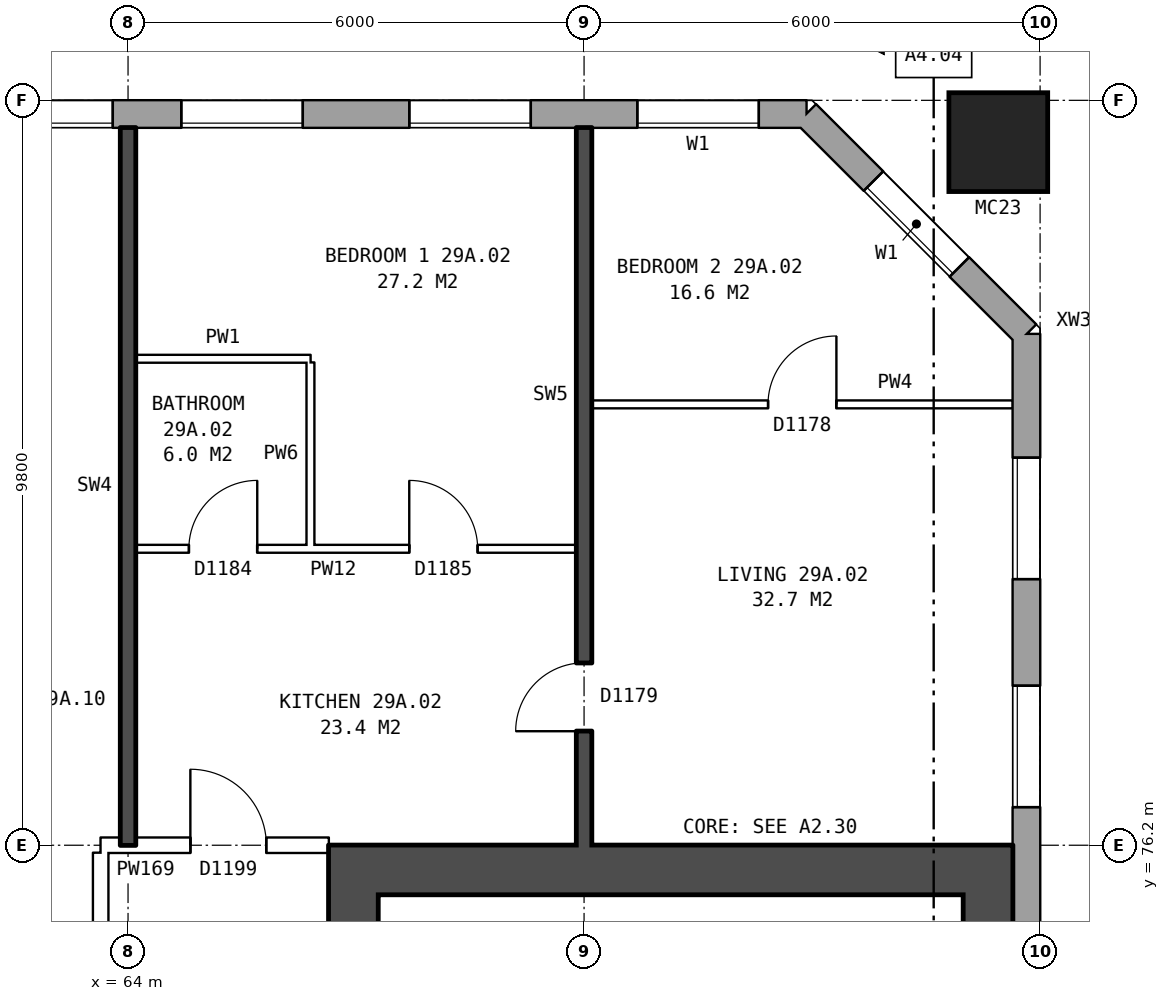
"""IFC4 building model, lengths in metres.
Left out: names, types, materials, properties, quantities, classifications, styles, units other than length and angle.
Written with IfcOpenShell. Run it as: python <this file> out.ifc"""

import sys

from ifc_helpers import new_model, si_unit, direction, frame, frame_2d, origin, origin_2d, place, context, subcontext, project, spatial, rectangle, hollow_rectangle, extrude, element, fill, save


model = new_model("IFC4")
c1 = context("Model", 3, precision=1e-05, world=origin(), true_north=direction((0.0, 1.0)))
c2 = subcontext(c1, "Body", "Model", "MODEL_VIEW")
j1 = project(units=[si_unit("LENGTHUNIT", "METRE"), si_unit("PLANEANGLEUNIT", "RADIAN")], contexts=[c1])
p1 = place(None, origin())
s1 = spatial("IfcSite", under=j1, at=p1, CompositionType="ELEMENT")
p2 = place(p1, origin())
s2 = spatial("IfcBuilding", under=s1, at=p2, CompositionType="ELEMENT")
p3 = place(p2, frame((0.0, 0.0, 105.7)))
s3 = spatial("IfcBuildingStorey", under=s2, at=p3, CompositionType="ELEMENT", Elevation=105.7)
p4 = place(p3, frame((75.45, 85.45, 0.0), z_axis=(0.0, 0.0, 1.0), x_axis=(1.0, 0.0, 0.0)))
e1 = element("IfcColumn", 1, at=p4, inside=s3, PredefinedType="COLUMN", context=c2, shape_type="SweptSolid", body=[
    extrude(hollow_rectangle(XDim=1.3, YDim=1.3, WallThickness=0.07, at=origin_2d()), origin(), (0.0, 0.0, 1.0), 3.1),
])
p5 = place(p3, frame((75.82, 57.075, 0.0), z_axis=(0.0, 0.0, 1.0), x_axis=(0.0, 1.0, 0.0)))
e2 = element("IfcWall", 2, at=p5, inside=s3, PredefinedType="STANDARD", context=c2, shape_type="SweptSolid", body=[
    extrude(rectangle(XDim=25.851, YDim=0.36, at=frame_2d((12.925, 0.0))), origin(), (0.0, 0.0, 1.0), 2.85),
])
p6 = place(p5, frame((1.625, 0.0, 0.8)))
e3 = element("IfcOpeningElement", 3, at=p6, cuts=e2, PredefinedType="OPENING", context=c2, shape_type="SweptSolid", body=[
    extrude(rectangle(XDim=1.6, YDim=1.8, at=frame_2d((0.8, 0.9))), frame((0.0, 0.19, 0.0), z_axis=(0.0, -1.0, 0.0), x_axis=(1.0, 0.0, 0.0)), (0.0, 0.0, 1.0), 0.38),
])
p7 = place(p5, frame((4.625, 0.0, 0.8)))
e4 = element("IfcOpeningElement", 4, at=p7, cuts=e2, PredefinedType="OPENING", context=c2, shape_type="SweptSolid", body=[
    extrude(rectangle(XDim=1.6, YDim=1.8, at=frame_2d((0.8, 0.9))), frame((0.0, 0.19, 0.0), z_axis=(0.0, -1.0, 0.0), x_axis=(1.0, 0.0, 0.0)), (0.0, 0.0, 1.0), 0.38),
])
p8 = place(p5, frame((19.625, 0.0, 0.8)))
e5 = element("IfcOpeningElement", 5, at=p8, cuts=e2, PredefinedType="OPENING", context=c2, shape_type="SweptSolid", body=[
    extrude(rectangle(XDim=1.6, YDim=1.8, at=frame_2d((0.8, 0.9))), frame((0.0, 0.19, 0.0), z_axis=(0.0, -1.0, 0.0), x_axis=(1.0, 0.0, 0.0)), (0.0, 0.0, 1.0), 0.38),
])
p9 = place(p5, frame((22.625, 0.0, 0.8)))
e6 = element("IfcOpeningElement", 6, at=p9, cuts=e2, PredefinedType="OPENING", context=c2, shape_type="SweptSolid", body=[
    extrude(rectangle(XDim=1.6, YDim=1.8, at=frame_2d((0.8, 0.9))), frame((0.0, 0.19, 0.0), z_axis=(0.0, -1.0, 0.0), x_axis=(1.0, 0.0, 0.0)), (0.0, 0.0, 1.0), 0.38),
])
p10 = place(p3, frame((75.82, 82.925, 0.0), z_axis=(0.0, 0.0, 1.0), x_axis=(-0.707106781187, 0.707106781187, 0.0)))
e7 = element("IfcWall", 7, at=p10, inside=s3, PredefinedType="STANDARD", context=c2, shape_type="SweptSolid", body=[
    extrude(rectangle(XDim=4.094, YDim=0.36, at=frame_2d((2.047, 0.0))), origin(), (0.0, 0.0, 1.0), 2.85),
])
p11 = place(p10, frame((1.247, 0.0, 0.8)))
e8 = element("IfcOpeningElement", 8, at=p11, cuts=e7, PredefinedType="OPENING", context=c2, shape_type="SweptSolid", body=[
    extrude(rectangle(XDim=1.6, YDim=1.8, at=frame_2d((0.8, 0.9))), frame((0.0, 0.19, 0.0), z_axis=(0.0, -1.0, 0.0), x_axis=(1.0, 0.0, 0.0)), (0.0, 0.0, 1.0), 0.38),
])
p12 = place(p3, frame((72.925, 85.82, 0.0), z_axis=(0.0, 0.0, 1.0), x_axis=(-1.0, 0.0, 0.0)))
e9 = element("IfcWall", 9, at=p12, inside=s3, PredefinedType="STANDARD", context=c2, shape_type="SweptSolid", body=[
    extrude(rectangle(XDim=44.851, YDim=0.36, at=frame_2d((22.425, 0.0))), origin(), (0.0, 0.0, 1.0), 2.85),
])
p13 = place(p12, frame((0.625, 0.0, 0.8)))
e10 = element("IfcOpeningElement", 10, at=p13, cuts=e9, PredefinedType="OPENING", context=c2, shape_type="SweptSolid", body=[
    extrude(rectangle(XDim=1.6, YDim=1.8, at=frame_2d((0.8, 0.9))), frame((0.0, 0.19, 0.0), z_axis=(0.0, -1.0, 0.0), x_axis=(1.0, 0.0, 0.0)), (0.0, 0.0, 1.0), 0.38),
])
p14 = place(p12, frame((3.625, 0.0, 0.8)))
e11 = element("IfcOpeningElement", 11, at=p14, cuts=e9, PredefinedType="OPENING", context=c2, shape_type="SweptSolid", body=[
    extrude(rectangle(XDim=1.6, YDim=1.8, at=frame_2d((0.8, 0.9))), frame((0.0, 0.19, 0.0), z_axis=(0.0, -1.0, 0.0), x_axis=(1.0, 0.0, 0.0)), (0.0, 0.0, 1.0), 0.38),
])
p15 = place(p12, frame((6.625, 0.0, 0.8)))
e12 = element("IfcOpeningElement", 12, at=p15, cuts=e9, PredefinedType="OPENING", context=c2, shape_type="SweptSolid", body=[
    extrude(rectangle(XDim=1.6, YDim=1.8, at=frame_2d((0.8, 0.9))), frame((0.0, 0.19, 0.0), z_axis=(0.0, -1.0, 0.0), x_axis=(1.0, 0.0, 0.0)), (0.0, 0.0, 1.0), 0.38),
])
p16 = place(p12, frame((9.125, 0.0, 0.8)))
e13 = element("IfcOpeningElement", 13, at=p16, cuts=e9, PredefinedType="OPENING", context=c2, shape_type="SweptSolid", body=[
    extrude(rectangle(XDim=1.6, YDim=1.8, at=frame_2d((0.8, 0.9))), frame((0.0, 0.19, 0.0), z_axis=(0.0, -1.0, 0.0), x_axis=(1.0, 0.0, 0.0)), (0.0, 0.0, 1.0), 0.38),
])
p17 = place(p12, frame((12.825, 0.0, 0.55)))
e14 = element("IfcOpeningElement", 14, at=p17, cuts=e9, PredefinedType="OPENING", context=c2, shape_type="SweptSolid", body=[
    extrude(rectangle(XDim=0.6, YDim=0.9, at=frame_2d((0.3, 0.45))), frame((0.0, 0.19, 0.0), z_axis=(0.0, -1.0, 0.0), x_axis=(1.0, 0.0, 0.0)), (0.0, 0.0, 1.0), 0.38),
])
p18 = place(p12, frame((15.625, 0.0, 0.8)))
e15 = element("IfcOpeningElement", 15, at=p18, cuts=e9, PredefinedType="OPENING", context=c2, shape_type="SweptSolid", body=[
    extrude(rectangle(XDim=1.6, YDim=1.8, at=frame_2d((0.8, 0.9))), frame((0.0, 0.19, 0.0), z_axis=(0.0, -1.0, 0.0), x_axis=(1.0, 0.0, 0.0)), (0.0, 0.0, 1.0), 0.38),
])
p19 = place(p12, frame((18.625, 0.0, 0.8)))
e16 = element("IfcOpeningElement", 16, at=p19, cuts=e9, PredefinedType="OPENING", context=c2, shape_type="SweptSolid", body=[
    extrude(rectangle(XDim=1.6, YDim=1.8, at=frame_2d((0.8, 0.9))), frame((0.0, 0.19, 0.0), z_axis=(0.0, -1.0, 0.0), x_axis=(1.0, 0.0, 0.0)), (0.0, 0.0, 1.0), 0.38),
])
p20 = place(p12, frame((21.625, 0.0, 0.8)))
e17 = element("IfcOpeningElement", 17, at=p20, cuts=e9, PredefinedType="OPENING", context=c2, shape_type="SweptSolid", body=[
    extrude(rectangle(XDim=1.6, YDim=1.8, at=frame_2d((0.8, 0.9))), frame((0.0, 0.19, 0.0), z_axis=(0.0, -1.0, 0.0), x_axis=(1.0, 0.0, 0.0)), (0.0, 0.0, 1.0), 0.38),
])
p21 = place(p12, frame((24.625, 0.0, 0.8)))
e18 = element("IfcOpeningElement", 18, at=p21, cuts=e9, PredefinedType="OPENING", context=c2, shape_type="SweptSolid", body=[
    extrude(rectangle(XDim=1.6, YDim=1.8, at=frame_2d((0.8, 0.9))), frame((0.0, 0.19, 0.0), z_axis=(0.0, -1.0, 0.0), x_axis=(1.0, 0.0, 0.0)), (0.0, 0.0, 1.0), 0.38),
])
p22 = place(p12, frame((27.625, 0.0, 0.8)))
e19 = element("IfcOpeningElement", 19, at=p22, cuts=e9, PredefinedType="OPENING", context=c2, shape_type="SweptSolid", body=[
    extrude(rectangle(XDim=1.6, YDim=1.8, at=frame_2d((0.8, 0.9))), frame((0.0, 0.19, 0.0), z_axis=(0.0, -1.0, 0.0), x_axis=(1.0, 0.0, 0.0)), (0.0, 0.0, 1.0), 0.38),
])
p23 = place(p12, frame((29.525, 0.0, 0.8)))
e20 = element("IfcOpeningElement", 20, at=p23, cuts=e9, PredefinedType="OPENING", context=c2, shape_type="SweptSolid", body=[
    extrude(rectangle(XDim=0.8, YDim=1.8, at=frame_2d((0.4, 0.9))), frame((0.0, 0.19, 0.0), z_axis=(0.0, -1.0, 0.0), x_axis=(1.0, 0.0, 0.0)), (0.0, 0.0, 1.0), 0.38),
])
p24 = place(p12, frame((33.325, 0.0, 1.4)))
e21 = element("IfcOpeningElement", 21, at=p24, cuts=e9, PredefinedType="OPENING", context=c2, shape_type="SweptSolid", body=[
    extrude(rectangle(XDim=1.0, YDim=1.2, at=frame_2d((0.5, 0.6))), frame((0.0, 0.19, 0.0), z_axis=(0.0, -1.0, 0.0), x_axis=(1.0, 0.0, 0.0)), (0.0, 0.0, 1.0), 0.38),
])
p25 = place(p12, frame((36.625, 0.0, 0.8)))
e22 = element("IfcOpeningElement", 22, at=p25, cuts=e9, PredefinedType="OPENING", context=c2, shape_type="SweptSolid", body=[
    extrude(rectangle(XDim=1.6, YDim=1.8, at=frame_2d((0.8, 0.9))), frame((0.0, 0.19, 0.0), z_axis=(0.0, -1.0, 0.0), x_axis=(1.0, 0.0, 0.0)), (0.0, 0.0, 1.0), 0.38),
])
p26 = place(p12, frame((39.625, 0.0, 0.8)))
e23 = element("IfcOpeningElement", 23, at=p26, cuts=e9, PredefinedType="OPENING", context=c2, shape_type="SweptSolid", body=[
    extrude(rectangle(XDim=1.6, YDim=1.8, at=frame_2d((0.8, 0.9))), frame((0.0, 0.19, 0.0), z_axis=(0.0, -1.0, 0.0), x_axis=(1.0, 0.0, 0.0)), (0.0, 0.0, 1.0), 0.38),
])
p27 = place(p12, frame((42.625, 0.0, 0.8)))
e24 = element("IfcOpeningElement", 24, at=p27, cuts=e9, PredefinedType="OPENING", context=c2, shape_type="SweptSolid", body=[
    extrude(rectangle(XDim=1.6, YDim=1.8, at=frame_2d((0.8, 0.9))), frame((0.0, 0.19, 0.0), z_axis=(0.0, -1.0, 0.0), x_axis=(1.0, 0.0, 0.0)), (0.0, 0.0, 1.0), 0.38),
])
p28 = place(p12, frame((11.025, 0.0, 1.5)))
e25 = element("IfcOpeningElement", 25, at=p28, cuts=e9, PredefinedType="OPENING", context=c2, shape_type="SweptSolid", body=[
    extrude(rectangle(XDim=0.6, YDim=0.9, at=frame_2d((0.3, 0.45))), frame((0.0, 0.19, 0.0), z_axis=(0.0, -1.0, 0.0), x_axis=(1.0, 0.0, 0.0)), (0.0, 0.0, 1.0), 0.38),
])
p29 = place(p12, frame((13.725, 0.0, 0.55)))
e26 = element("IfcOpeningElement", 26, at=p29, cuts=e9, PredefinedType="OPENING", context=c2, shape_type="SweptSolid", body=[
    extrude(rectangle(XDim=1.0, YDim=1.5, at=frame_2d((0.5, 0.75))), frame((0.0, 0.19, 0.0), z_axis=(0.0, -1.0, 0.0), x_axis=(1.0, 0.0, 0.0)), (0.0, 0.0, 1.0), 0.38),
])
p30 = place(p12, frame((30.625, 0.0, 0.8)))
e27 = element("IfcOpeningElement", 27, at=p30, cuts=e9, PredefinedType="OPENING", context=c2, shape_type="SweptSolid", body=[
    extrude(rectangle(XDim=1.0, YDim=0.9, at=frame_2d((0.5, 0.45))), frame((0.0, 0.19, 0.0), z_axis=(0.0, -1.0, 0.0), x_axis=(1.0, 0.0, 0.0)), (0.0, 0.0, 1.0), 0.38),
])
p31 = place(p12, frame((34.625, 0.0, 0.8)))
e28 = element("IfcOpeningElement", 28, at=p31, cuts=e9, PredefinedType="OPENING", context=c2, shape_type="SweptSolid", body=[
    extrude(rectangle(XDim=1.4, YDim=1.8, at=frame_2d((0.7, 0.9))), frame((0.0, 0.19, 0.0), z_axis=(0.0, -1.0, 0.0), x_axis=(1.0, 0.0, 0.0)), (0.0, 0.0, 1.0), 0.38),
])
p32 = place(p3, frame((66.965, 64.45, 0.0), z_axis=(0.0, 0.0, 1.0), x_axis=(0.0, 1.0, 0.0)))
e29 = element("IfcWall", 29, at=p32, inside=s3, PredefinedType="SHEAR", context=c2, shape_type="SweptSolid", body=[
    extrude(rectangle(XDim=11.1, YDim=0.65, at=frame_2d((5.55, 0.0))), origin(), (0.0, 0.0, 1.0), 2.85),
])
p33 = place(p32, frame((0.675, 0.0, 0.0)))
e30 = element("IfcOpeningElement", 30, at=p33, cuts=e29, PredefinedType="OPENING", context=c2, shape_type="SweptSolid", body=[
    extrude(rectangle(XDim=1.1, YDim=2.1, at=frame_2d((0.55, 1.05))), frame((0.0, 0.335, 0.0), z_axis=(0.0, -1.0, 0.0), x_axis=(1.0, 0.0, 0.0)), (0.0, 0.0, 1.0), 0.67),
])
p34 = place(p32, frame((9.25, 0.0, 0.0)))
e31 = element("IfcOpeningElement", 31, at=p34, cuts=e29, PredefinedType="OPENING", context=c2, shape_type="SweptSolid", body=[
    extrude(rectangle(XDim=1.1, YDim=2.1, at=frame_2d((0.55, 1.05))), frame((0.0, 0.335, 0.0), z_axis=(0.0, -1.0, 0.0), x_axis=(1.0, 0.0, 0.0)), (0.0, 0.0, 1.0), 0.67),
])
p35 = place(p3, frame((75.315, 64.45, 0.0), z_axis=(0.0, 0.0, 1.0), x_axis=(0.0, 1.0, 0.0)))
e32 = element("IfcWall", 32, at=p35, inside=s3, PredefinedType="SHEAR", context=c2, shape_type="SweptSolid", body=[
    extrude(rectangle(XDim=11.1, YDim=0.65, at=frame_2d((5.55, 0.0))), origin(), (0.0, 0.0, 1.0), 2.85),
])
p36 = place(p3, frame((66.64, 75.875, 0.0), z_axis=(0.0, 0.0, 1.0), x_axis=(1.0, 0.0, 0.0)))
e33 = element("IfcWall", 33, at=p36, inside=s3, PredefinedType="SHEAR", context=c2, shape_type="SweptSolid", body=[
    extrude(rectangle(XDim=9.0, YDim=0.65, at=frame_2d((4.5, 0.0))), origin(), (0.0, 0.0, 1.0), 2.85),
])
p37 = place(p3, frame((63.64, 63.9, 0.0), z_axis=(0.0, 0.0, 1.0), x_axis=(0.0, 1.0, 0.0)))
e34 = element("IfcWall", 34, at=p37, inside=s3, PredefinedType="PARTITIONING", context=c2, shape_type="SweptSolid", body=[
    extrude(rectangle(XDim=12.2, YDim=0.2, at=frame_2d((6.1, 0.0))), origin(), (0.0, 0.0, 1.0), 2.85),
])
p38 = place(p37, frame((5.1, 0.0, 0.0)))
e35 = element("IfcOpeningElement", 35, at=p38, cuts=e34, PredefinedType="OPENING", context=c2, shape_type="SweptSolid", body=[
    extrude(rectangle(XDim=2.0, YDim=2.1, at=frame_2d((1.0, 1.05))), frame((0.0, 0.11, 0.0), z_axis=(0.0, -1.0, 0.0), x_axis=(1.0, 0.0, 0.0)), (0.0, 0.0, 1.0), 0.22),
])
p39 = place(p3, frame((63.64, 76.2, 0.0), z_axis=(0.0, 0.0, 1.0), x_axis=(1.0, 0.0, 0.0)))
e36 = element("IfcWall", 36, at=p39, inside=s3, PredefinedType="PARTITIONING", context=c2, shape_type="SweptSolid", body=[
    extrude(rectangle(XDim=3.0, YDim=0.2, at=frame_2d((1.5, 0.0))), origin(), (0.0, 0.0, 1.0), 2.85),
])
p40 = place(p39, frame((1.18, 0.0, 0.0)))
e37 = element("IfcOpeningElement", 37, at=p40, cuts=e36, PredefinedType="OPENING", context=c2, shape_type="SweptSolid", body=[
    extrude(rectangle(XDim=1.0, YDim=2.1, at=frame_2d((0.5, 1.05))), frame((0.0, 0.11, 0.0), z_axis=(0.0, -1.0, 0.0), x_axis=(1.0, 0.0, 0.0)), (0.0, 0.0, 1.0), 0.22),
])
p41 = place(p3, frame((64.1, 80.1, 0.0), z_axis=(0.0, 0.0, 1.0), x_axis=(1.0, 0.0, 0.0)))
e38 = element("IfcWall", 38, at=p41, inside=s3, PredefinedType="PARTITIONING", context=c2, shape_type="SweptSolid", body=[
    extrude(rectangle(XDim=5.8, YDim=0.1, at=frame_2d((2.9, 0.0))), origin(), (0.0, 0.0, 1.0), 2.85),
])
p42 = place(p41, frame((3.6, 0.0, 0.0)))
e39 = element("IfcOpeningElement", 39, at=p42, cuts=e38, PredefinedType="OPENING", context=c2, shape_type="SweptSolid", body=[
    extrude(rectangle(XDim=0.9, YDim=2.1, at=frame_2d((0.45, 1.05))), frame((0.0, 0.06, 0.0), z_axis=(0.0, -1.0, 0.0), x_axis=(1.0, 0.0, 0.0)), (0.0, 0.0, 1.0), 0.12),
])
p43 = place(p41, frame((0.7, 0.0, 0.0)))
e40 = element("IfcOpeningElement", 40, at=p43, cuts=e38, PredefinedType="OPENING", context=c2, shape_type="SweptSolid", body=[
    extrude(rectangle(XDim=0.9, YDim=2.1, at=frame_2d((0.45, 1.05))), frame((0.0, 0.06, 0.0), z_axis=(0.0, -1.0, 0.0), x_axis=(1.0, 0.0, 0.0)), (0.0, 0.0, 1.0), 0.12),
])
p44 = place(p3, frame((70.1, 82.0, 0.0), z_axis=(0.0, 0.0, 1.0), x_axis=(1.0, 0.0, 0.0)))
e41 = element("IfcWall", 41, at=p44, inside=s3, PredefinedType="PARTITIONING", context=c2, shape_type="SweptSolid", body=[
    extrude(rectangle(XDim=5.54, YDim=0.1, at=frame_2d((2.77, 0.0))), origin(), (0.0, 0.0, 1.0), 2.85),
])
p45 = place(p44, frame((2.32, 0.0, 0.0)))
e42 = element("IfcOpeningElement", 42, at=p45, cuts=e41, PredefinedType="OPENING", context=c2, shape_type="SweptSolid", body=[
    extrude(rectangle(XDim=0.9, YDim=2.1, at=frame_2d((0.45, 1.05))), frame((0.0, 0.06, 0.0), z_axis=(0.0, -1.0, 0.0), x_axis=(1.0, 0.0, 0.0)), (0.0, 0.0, 1.0), 0.12),
])
p46 = place(p3, frame((64.1, 82.6, 0.0), z_axis=(0.0, 0.0, 1.0), x_axis=(1.0, 0.0, 0.0)))
e43 = element("IfcWall", 43, at=p46, inside=s3, PredefinedType="PARTITIONING", context=c2, shape_type="SweptSolid", body=[
    extrude(rectangle(XDim=2.3, YDim=0.1, at=frame_2d((1.15, 0.0))), origin(), (0.0, 0.0, 1.0), 2.85),
])
p47 = place(p3, frame((64.0, 76.2, 0.0), z_axis=(0.0, 0.0, 1.0), x_axis=(0.0, 1.0, 0.0)))
e44 = element("IfcWall", 44, at=p47, inside=s3, PredefinedType="SOLIDWALL", context=c2, shape_type="SweptSolid", body=[
    extrude(rectangle(XDim=9.44, YDim=0.2, at=frame_2d((4.72, 0.0))), origin(), (0.0, 0.0, 1.0), 2.85),
])
p48 = place(p3, frame((66.4, 80.15, 0.0), z_axis=(0.0, 0.0, 1.0), x_axis=(0.0, 1.0, 0.0)))
e45 = element("IfcWall", 45, at=p48, inside=s3, PredefinedType="PARTITIONING", context=c2, shape_type="SweptSolid", body=[
    extrude(rectangle(XDim=2.4, YDim=0.1, at=frame_2d((1.2, 0.0))), origin(), (0.0, 0.0, 1.0), 2.85),
])
p49 = place(p3, frame((70.0, 76.2, 0.0), z_axis=(0.0, 0.0, 1.0), x_axis=(0.0, 1.0, 0.0)))
e46 = element("IfcWall", 46, at=p49, inside=s3, PredefinedType="SOLIDWALL", context=c2, shape_type="SweptSolid", body=[
    extrude(rectangle(XDim=9.44, YDim=0.2, at=frame_2d((4.72, 0.0))), origin(), (0.0, 0.0, 1.0), 2.85),
])
p50 = place(p49, frame((1.5, 0.0, 0.0)))
e47 = element("IfcOpeningElement", 47, at=p50, cuts=e46, PredefinedType="OPENING", context=c2, shape_type="SweptSolid", body=[
    extrude(rectangle(XDim=0.9, YDim=2.1, at=frame_2d((0.45, 1.05))), frame((0.0, 0.11, 0.0), z_axis=(0.0, -1.0, 0.0), x_axis=(1.0, 0.0, 0.0)), (0.0, 0.0, 1.0), 0.22),
])
p51 = place(p8, origin())
e48 = element("IfcWindow", 48, at=p51, inside=s3, PartitioningType="SINGLE_PANEL", PredefinedType="WINDOW", context=c2, shape_type="SweptSolid", body=[
    extrude(rectangle(XDim=1.6, YDim=1.8, at=frame_2d((0.8, 0.9))), frame((0.0, 0.15, 0.0), z_axis=(0.0, -1.0, 0.0), x_axis=(1.0, 0.0, 0.0)), (0.0, 0.0, 1.0), 0.06),
])
fill(e5, e48)
p52 = place(p9, origin())
e49 = element("IfcWindow", 49, at=p52, inside=s3, PartitioningType="SINGLE_PANEL", PredefinedType="WINDOW", context=c2, shape_type="SweptSolid", body=[
    extrude(rectangle(XDim=1.6, YDim=1.8, at=frame_2d((0.8, 0.9))), frame((0.0, 0.15, 0.0), z_axis=(0.0, -1.0, 0.0), x_axis=(1.0, 0.0, 0.0)), (0.0, 0.0, 1.0), 0.06),
])
fill(e6, e49)
p53 = place(p11, origin())
e50 = element("IfcWindow", 50, at=p53, inside=s3, PartitioningType="SINGLE_PANEL", PredefinedType="WINDOW", context=c2, shape_type="SweptSolid", body=[
    extrude(rectangle(XDim=1.6, YDim=1.8, at=frame_2d((0.8, 0.9))), frame((0.0, 0.15, 0.0), z_axis=(0.0, -1.0, 0.0), x_axis=(1.0, 0.0, 0.0)), (0.0, 0.0, 1.0), 0.06),
])
fill(e8, e50)
p54 = place(p13, origin())
e51 = element("IfcWindow", 51, at=p54, inside=s3, PartitioningType="SINGLE_PANEL", PredefinedType="WINDOW", context=c2, shape_type="SweptSolid", body=[
    extrude(rectangle(XDim=1.6, YDim=1.8, at=frame_2d((0.8, 0.9))), frame((0.0, 0.15, 0.0), z_axis=(0.0, -1.0, 0.0), x_axis=(1.0, 0.0, 0.0)), (0.0, 0.0, 1.0), 0.06),
])
fill(e10, e51)
p55 = place(p14, origin())
e52 = element("IfcWindow", 52, at=p55, inside=s3, PartitioningType="SINGLE_PANEL", PredefinedType="WINDOW", context=c2, shape_type="SweptSolid", body=[
    extrude(rectangle(XDim=1.6, YDim=1.8, at=frame_2d((0.8, 0.9))), frame((0.0, 0.15, 0.0), z_axis=(0.0, -1.0, 0.0), x_axis=(1.0, 0.0, 0.0)), (0.0, 0.0, 1.0), 0.06),
])
fill(e11, e52)
p56 = place(p15, origin())
e53 = element("IfcWindow", 53, at=p56, inside=s3, PartitioningType="SINGLE_PANEL", PredefinedType="WINDOW", context=c2, shape_type="SweptSolid", body=[
    extrude(rectangle(XDim=1.6, YDim=1.8, at=frame_2d((0.8, 0.9))), frame((0.0, 0.15, 0.0), z_axis=(0.0, -1.0, 0.0), x_axis=(1.0, 0.0, 0.0)), (0.0, 0.0, 1.0), 0.06),
])
fill(e12, e53)
p57 = place(p16, origin())
e54 = element("IfcWindow", 54, at=p57, inside=s3, PartitioningType="SINGLE_PANEL", PredefinedType="WINDOW", context=c2, shape_type="SweptSolid", body=[
    extrude(rectangle(XDim=1.6, YDim=1.8, at=frame_2d((0.8, 0.9))), frame((0.0, 0.15, 0.0), z_axis=(0.0, -1.0, 0.0), x_axis=(1.0, 0.0, 0.0)), (0.0, 0.0, 1.0), 0.06),
])
fill(e13, e54)
p58 = place(p42, origin())
e55 = element("IfcDoor", 55, at=p58, inside=s3, OperationType="SINGLE_SWING_LEFT", PredefinedType="DOOR", context=c2, shape_type="SweptSolid", body=[
    extrude(rectangle(XDim=0.9, YDim=2.1, at=frame_2d((0.45, 1.05))), frame((0.0, 0.025, 0.0), z_axis=(0.0, -1.0, 0.0), x_axis=(1.0, 0.0, 0.0)), (0.0, 0.0, 1.0), 0.05),
])
fill(e39, e55)
p59 = place(p45, origin())
e56 = element("IfcDoor", 56, at=p59, inside=s3, OperationType="SINGLE_SWING_RIGHT", PredefinedType="DOOR", context=c2, shape_type="SweptSolid", body=[
    extrude(rectangle(XDim=0.9, YDim=2.1, at=frame_2d((0.45, 1.05))), frame((0.0, 0.025, 0.0), z_axis=(0.0, -1.0, 0.0), x_axis=(1.0, 0.0, 0.0)), (0.0, 0.0, 1.0), 0.05),
])
fill(e42, e56)
p60 = place(p40, origin())
e57 = element("IfcDoor", 57, at=p60, inside=s3, OperationType="SINGLE_SWING_LEFT", PredefinedType="DOOR", context=c2, shape_type="SweptSolid", body=[
    extrude(rectangle(XDim=1.0, YDim=2.1, at=frame_2d((0.5, 1.05))), frame((0.0, 0.025, 0.0), z_axis=(0.0, -1.0, 0.0), x_axis=(1.0, 0.0, 0.0)), (0.0, 0.0, 1.0), 0.05),
])
fill(e37, e57)
p61 = place(p50, origin())
e58 = element("IfcDoor", 58, at=p61, inside=s3, OperationType="SINGLE_SWING_LEFT", PredefinedType="DOOR", context=c2, shape_type="SweptSolid", body=[
    extrude(rectangle(XDim=0.9, YDim=2.1, at=frame_2d((0.45, 1.05))), frame((0.0, 0.025, 0.0), z_axis=(0.0, -1.0, 0.0), x_axis=(1.0, 0.0, 0.0)), (0.0, 0.0, 1.0), 0.05),
])
fill(e47, e58)
p62 = place(p43, origin())
e59 = element("IfcDoor", 59, at=p62, inside=s3, OperationType="SINGLE_SWING_RIGHT", PredefinedType="DOOR", context=c2, shape_type="SweptSolid", body=[
    extrude(rectangle(XDim=0.9, YDim=2.1, at=frame_2d((0.45, 1.05))), frame((0.0, 0.025, 0.0), z_axis=(0.0, -1.0, 0.0), x_axis=(1.0, 0.0, 0.0)), (0.0, 0.0, 1.0), 0.05),
])
fill(e40, e59)
save(model, sys.argv[1])
